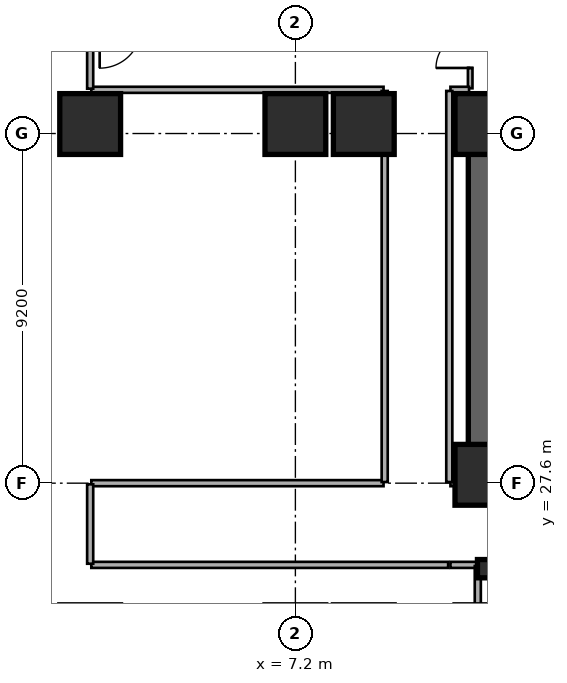
"""IFC4 building model, lengths in metres.
Left out: names, types, materials, properties, quantities, classifications, styles, units other than length and angle.
Written with IfcOpenShell. Run it as: python <this file> out.ifc"""

import sys

from ifc_helpers import new_model, si_unit, direction, frame, frame_2d, origin, origin_2d, place, context, subcontext, project, spatial, rectangle, i_section, extrude, element, fill, save


model = new_model("IFC4")
c1 = context("Model", 3, precision=1e-05, world=origin(), true_north=direction((0.0, 1.0)))
c2 = subcontext(c1, "Body", "Model", "MODEL_VIEW")
j1 = project(units=[si_unit("LENGTHUNIT", "METRE"), si_unit("PLANEANGLEUNIT", "RADIAN")], contexts=[c1])
p1 = place(None, origin())
s1 = spatial("IfcSite", under=j1, at=p1, CompositionType="ELEMENT")
p2 = place(p1, origin())
s2 = spatial("IfcBuilding", under=s1, at=p2, CompositionType="ELEMENT")
p3 = place(p2, frame((0.0, 0.0, -13.2)))
s3 = spatial("IfcBuildingStorey", under=s2, at=p3, CompositionType="ELEMENT", Elevation=-13.2)
p4 = place(p3, frame((12.15, 37.05, 0.0), z_axis=(0.0, 0.0, 1.0), x_axis=(1.0, 0.0, 0.0)))
e1 = element("IfcWall", 1, at=p4, inside=s3, PredefinedType="SHEAR", context=c2, shape_type="SweptSolid", body=[
    extrude(rectangle(XDim=33.23, YDim=0.8, at=frame_2d((16.615, 0.0))), origin(), (0.0, 0.0, 1.0), 4.4),
])
p5 = place(p3, frame((21.18, 27.82, 0.0), z_axis=(0.0, 0.0, 1.0), x_axis=(-1.0, 0.0, 0.0)))
e2 = element("IfcWall", 2, at=p5, inside=s3, PredefinedType="SHEAR", context=c2, shape_type="SweptSolid", body=[
    extrude(rectangle(XDim=9.03, YDim=0.8, at=frame_2d((4.515, 0.0))), origin(), (0.0, 0.0, 1.0), 4.4),
])
p6 = place(p5, frame((2.68, 0.0, 0.0)))
e3 = element("IfcOpeningElement", 3, at=p6, cuts=e2, PredefinedType="OPENING", context=c2, shape_type="SweptSolid", body=[
    extrude(rectangle(XDim=1.1, YDim=2.15, at=frame_2d((0.55, 1.075))), frame((0.0, 0.41, 0.0), z_axis=(0.0, -1.0, 0.0), x_axis=(1.0, 0.0, 0.0)), (0.0, 0.0, 1.0), 0.82),
])
p7 = place(p3, frame((12.15, 28.22, 0.0), z_axis=(0.0, 0.0, 1.0), x_axis=(0.0, 1.0, 0.0)))
e4 = element("IfcWall", 4, at=p7, inside=s3, PredefinedType="SHEAR", context=c2, shape_type="SweptSolid", body=[
    extrude(rectangle(XDim=8.43, YDim=0.8, at=frame_2d((4.215, 0.0))), origin(), (0.0, 0.0, 1.0), 4.4),
])
for number, where, z_axis, x_axis in (
    (5, (12.2, 27.82, 0.0), (0.0, 0.0, 1.0), (1.0, 0.0, 0.0)),
    (6, (12.2, 37.05, 0.0), (0.0, 0.0, 1.0), (1.0, 0.0, 0.0)),
):
    element("IfcColumn", number, at=place(p3, frame(where, z_axis=z_axis, x_axis=x_axis)), inside=s3, PredefinedType="COLUMN", context=c2, shape_type="SweptSolid", body=[
        extrude(rectangle(XDim=1.6, YDim=1.6, at=origin_2d()), origin(), (0.0, 0.0, 1.0), 4.4),
    ])
p8 = place(p3, frame((12.2, 25.35, 0.0), z_axis=(0.0, 0.0, 1.0), x_axis=(1.0, 0.0, 0.0)))
e7 = element("IfcColumn", 7, at=p8, inside=s3, PredefinedType="COLUMN", context=c2, shape_type="SweptSolid", body=[
    extrude(i_section(OverallWidth=0.418, OverallDepth=0.481, WebThickness=0.043, FlangeThickness=0.068, FilletRadius=0.015, at=origin_2d()), origin(), (0.0, 0.0, 1.0), 4.4),
])
for number, where, z_axis, x_axis in (
    (8, (1.8, 37.05, 0.0), (0.0, 0.0, 1.0), (1.0, 0.0, 0.0)),
    (9, (7.2, 37.05, 0.0), (0.0, 0.0, 1.0), (1.0, 0.0, 0.0)),
    (10, (9.0, 37.05, 0.0), (0.0, 0.0, 1.0), (1.0, 0.0, 0.0)),
):
    element("IfcColumn", number, at=place(p3, frame(where, z_axis=z_axis, x_axis=x_axis)), inside=s3, PredefinedType="COLUMN", context=c2, shape_type="SweptSolid", body=[
        extrude(rectangle(XDim=1.6, YDim=1.6, at=origin_2d()), origin(), (0.0, 0.0, 1.0), 4.4),
    ])
p9 = place(p3, frame((12.04, 25.45, 0.0), z_axis=(0.0, 0.0, 1.0), x_axis=(1.0, 0.0, 0.0)))
e11 = element("IfcWall", 11, at=p9, inside=s3, PredefinedType="PARTITIONING", context=c2, shape_type="SweptSolid", body=[
    extrude(rectangle(XDim=11.12, YDim=0.16, at=frame_2d((5.56, 0.0))), origin(), (0.0, 0.0, 1.0), 3.246),
])
p10 = place(p9, frame((4.96, 0.0, 0.0)))
e12 = element("IfcOpeningElement", 12, at=p10, cuts=e11, PredefinedType="OPENING", context=c2, shape_type="SweptSolid", body=[
    extrude(rectangle(XDim=1.2, YDim=2.15, at=frame_2d((0.6, 1.075))), frame((0.0, 0.09, 0.0), z_axis=(0.0, -1.0, 0.0), x_axis=(1.0, 0.0, 0.0)), (0.0, 0.0, 1.0), 0.18),
])
p11 = place(p3, frame((11.8, 37.99, 0.0), z_axis=(0.0, 0.0, 1.0), x_axis=(0.0, 1.0, 0.0)))
e13 = element("IfcWall", 13, at=p11, inside=s3, PredefinedType="PARTITIONING", context=c2, shape_type="SweptSolid", body=[
    extrude(rectangle(XDim=1.97, YDim=0.12, at=frame_2d((0.985, 0.0))), origin(), (0.0, 0.0, 1.0), 3.41),
])
p12 = place(p11, frame((0.535, 0.0, 0.0)))
e14 = element("IfcOpeningElement", 14, at=p12, cuts=e13, PredefinedType="OPENING", context=c2, shape_type="SweptSolid", body=[
    extrude(rectangle(XDim=0.9, YDim=2.1, at=frame_2d((0.45, 1.05))), frame((0.0, 0.07, 0.0), z_axis=(0.0, -1.0, 0.0), x_axis=(1.0, 0.0, 0.0)), (0.0, 0.0, 1.0), 0.14),
])
p13 = place(p3, frame((11.28, 25.45, 0.0), z_axis=(0.0, 0.0, 1.0), x_axis=(1.0, 0.0, 0.0)))
e15 = element("IfcWall", 15, at=p13, inside=s3, PredefinedType="PARTITIONING", context=c2, shape_type="SweptSolid", body=[
    extrude(rectangle(XDim=0.69, YDim=0.16, at=frame_2d((0.345, 0.0))), origin(), (0.0, 0.0, 1.0), 3.246),
])
p14 = place(p3, frame((11.28, 27.6, 0.0), z_axis=(0.0, 0.0, 1.0), x_axis=(1.0, 0.0, 0.0)))
e16 = element("IfcWall", 16, at=p14, inside=s3, PredefinedType="PARTITIONING", context=c2, shape_type="SweptSolid", body=[
    extrude(rectangle(XDim=0.84, YDim=0.16, at=frame_2d((0.42, 0.0))), origin(), (0.0, 0.0, 1.0), 3.052),
])
p15 = place(p3, frame((1.83, 25.45, 0.0), z_axis=(0.0, 0.0, 1.0), x_axis=(1.0, 0.0, 0.0)))
e17 = element("IfcWall", 17, at=p15, inside=s3, PredefinedType="PARTITIONING", context=c2, shape_type="SweptSolid", body=[
    extrude(rectangle(XDim=9.39, YDim=0.16, at=frame_2d((4.695, 0.0))), origin(), (0.0, 0.0, 1.0), 4.08),
])
p16 = place(p3, frame((1.83, 27.6, 0.0), z_axis=(0.0, 0.0, 1.0), x_axis=(1.0, 0.0, 0.0)))
e18 = element("IfcWall", 18, at=p16, inside=s3, PredefinedType="PARTITIONING", context=c2, shape_type="SweptSolid", body=[
    extrude(rectangle(XDim=7.69, YDim=0.16, at=frame_2d((3.845, 0.0))), origin(), (0.0, 0.0, 1.0), 4.08),
])
p17 = place(p3, frame((1.8, 25.48, 0.0), z_axis=(0.0, 0.0, 1.0), x_axis=(0.0, 1.0, 0.0)))
e19 = element("IfcWall", 19, at=p17, inside=s3, PredefinedType="PARTITIONING", context=c2, shape_type="SweptSolid", body=[
    extrude(rectangle(XDim=2.09, YDim=0.16, at=frame_2d((1.045, 0.0))), origin(), (0.0, 0.0, 1.0), 4.08),
])
p18 = place(p3, frame((1.83, 37.95, 0.0), z_axis=(0.0, 0.0, 1.0), x_axis=(1.0, 0.0, 0.0)))
e20 = element("IfcWall", 20, at=p18, inside=s3, PredefinedType="PARTITIONING", context=c2, shape_type="SweptSolid", body=[
    extrude(rectangle(XDim=7.69, YDim=0.16, at=frame_2d((3.845, 0.0))), origin(), (0.0, 0.0, 1.0), 4.08),
])
p19 = place(p3, frame((11.28, 37.95, 0.0), z_axis=(0.0, 0.0, 1.0), x_axis=(1.0, 0.0, 0.0)))
e21 = element("IfcWall", 21, at=p19, inside=s3, PredefinedType="PARTITIONING", context=c2, shape_type="SweptSolid", body=[
    extrude(rectangle(XDim=0.49, YDim=0.16, at=frame_2d((0.245, 0.0))), origin(), (0.0, 0.0, 1.0), 3.41),
])
p20 = place(p3, frame((1.8, 37.98, 0.0), z_axis=(0.0, 0.0, 1.0), x_axis=(0.0, 1.0, 0.0)))
e22 = element("IfcWall", 22, at=p20, inside=s3, PredefinedType="PARTITIONING", context=c2, shape_type="SweptSolid", body=[
    extrude(rectangle(XDim=1.785, YDim=0.16, at=frame_2d((0.893, 0.0))), origin(), (0.0, 0.0, 1.0), 4.08),
])
for number, where, z_axis, x_axis in (
    (23, (9.55, 27.63, 0.0), (0.0, 0.0, 1.0), (0.0, 1.0, 0.0)),
    (24, (11.25, 27.63, 0.0), (0.0, 0.0, 1.0), (0.0, 1.0, 0.0)),
):
    element("IfcWall", number, at=place(p3, frame(where, z_axis=z_axis, x_axis=x_axis)), inside=s3, PredefinedType="PARTITIONING", context=c2, shape_type="SweptSolid", body=[
        extrude(rectangle(XDim=10.29, YDim=0.16, at=frame_2d((5.145, 0.0))), origin(), (0.0, 0.0, 1.0), 4.08),
    ])
p21 = place(p3, frame((12.0, 18.03, 0.0), z_axis=(0.0, 0.0, 1.0), x_axis=(0.0, 1.0, 0.0)))
e25 = element("IfcWall", 25, at=p21, inside=s3, PredefinedType="PARTITIONING", context=c2, shape_type="SweptSolid", body=[
    extrude(rectangle(XDim=7.39, YDim=0.16, at=frame_2d((3.695, 0.0))), origin(), (0.0, 0.0, 1.0), 2.66),
])
p22 = place(p12, origin())
e26 = element("IfcDoor", 26, at=p22, inside=s3, OperationType="SINGLE_SWING_LEFT", PredefinedType="DOOR", context=c2, shape_type="SweptSolid", body=[
    extrude(rectangle(XDim=0.9, YDim=2.1, at=frame_2d((0.45, 1.05))), frame((0.0, 0.025, 0.0), z_axis=(0.0, -1.0, 0.0), x_axis=(1.0, 0.0, 0.0)), (0.0, 0.0, 1.0), 0.05),
])
fill(e14, e26)
save(model, sys.argv[1])
